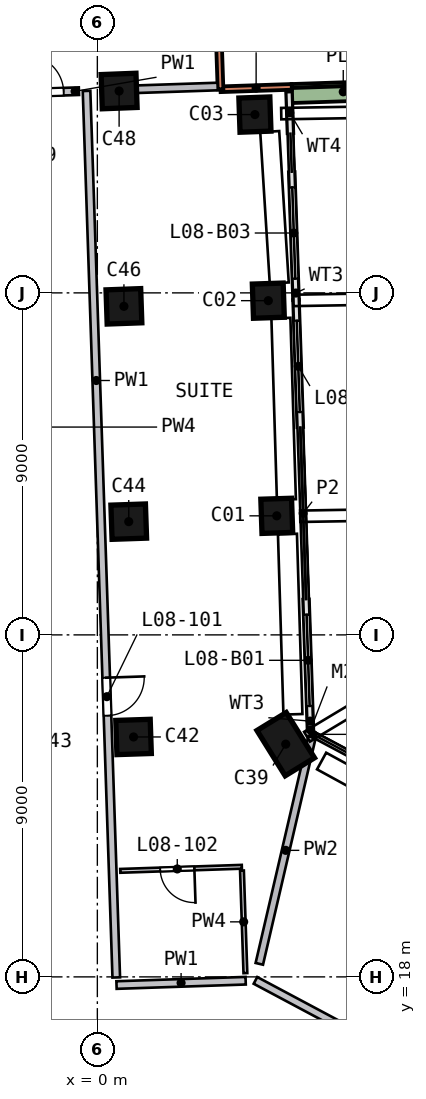
"""IFC4 building model, lengths in metres.
Left out: names, types, materials, properties, quantities, classifications, styles, units other than length and angle.
Written with IfcOpenShell. Run it as: python <this file> out.ifc"""

import sys

from ifc_helpers import new_model, si_unit, direction, frame, frame_2d, origin, origin_2d, place, context, subcontext, project, spatial, rectangle, extrude, element, fill, save


model = new_model("IFC4")
c1 = context("Model", 3, precision=1e-05, world=origin(), true_north=direction((0.0, 1.0)))
c2 = subcontext(c1, "Body", "Model", "MODEL_VIEW")
j1 = project(units=[si_unit("LENGTHUNIT", "METRE"), si_unit("PLANEANGLEUNIT", "RADIAN")], contexts=[c1])
p1 = place(None, origin())
s1 = spatial("IfcSite", under=j1, at=p1, CompositionType="ELEMENT")
p2 = place(p1, origin())
s2 = spatial("IfcBuilding", under=s1, at=p2, CompositionType="ELEMENT")
p3 = place(p2, frame((0.0, 0.0, 42.5)))
s3 = spatial("IfcBuildingStorey", under=s2, at=p3, CompositionType="ELEMENT", Elevation=42.5)
p4 = place(p3, frame((4.894, 30.12, 0.0), z_axis=(-0.142336215, 0.010453644, 0.989763165), x_axis=(-0.031226717, 0.999399073, -0.015046079)))
e1 = element("IfcColumn", 1, at=p4, inside=s3, PredefinedType="COLUMN", context=c2, shape_type="SweptSolid", body=[
    extrude(rectangle(XDim=0.9, YDim=0.8, at=origin_2d()), origin(), (0.0, 0.0, 1.0), 3.223),
])
p5 = place(p3, frame((4.703, 35.798, 0.0), z_axis=(-0.167945562, -0.002263417, 0.985793673), x_axis=(-0.033091095, 0.999446749, -0.003342827)))
e2 = element("IfcColumn", 2, at=p5, inside=s3, PredefinedType="COLUMN", context=c2, shape_type="SweptSolid", body=[
    extrude(rectangle(XDim=0.9, YDim=0.8, at=origin_2d()), origin(), (0.0, 0.0, 1.0), 3.236),
])
p6 = place(p3, frame((4.378, 40.711, 0.0), z_axis=(-0.189716676, -0.01540274, 0.981718054), x_axis=(-0.035211098, 0.999340492, 0.008874696)))
e3 = element("IfcColumn", 3, at=p6, inside=s3, PredefinedType="COLUMN", context=c2, shape_type="SweptSolid", body=[
    extrude(rectangle(XDim=0.9, YDim=0.8, at=origin_2d()), origin(), (0.0, 0.0, 1.0), 3.249),
])
p7 = place(p3, frame((5.095, 24.096, 0.0), z_axis=(-0.114771967, 0.023258425, 0.99311955), x_axis=(0.521259361, -0.849627286, 0.080138343)))
e4 = element("IfcColumn", 4, at=p7, inside=s3, PredefinedType="COLUMN", context=c2, shape_type="SweptSolid", body=[
    extrude(rectangle(XDim=1.4, YDim=0.9, at=origin_2d()), origin(), (0.0, 0.0, 1.0), 3.212),
])
p8 = place(p3, frame((1.093, 24.309, 0.0), z_axis=(-0.115627147, 0.004257147, 0.993283565), x_axis=(-0.032307268, 0.99944561, -0.008044414)))
e5 = element("IfcColumn", 5, at=p8, inside=s3, PredefinedType="COLUMN", context=c2, shape_type="SweptSolid", body=[
    extrude(rectangle(XDim=0.9, YDim=0.9, at=origin_2d()), origin(), (0.0, 0.0, 1.0), 3.211),
])
p9 = place(p3, frame((0.998, 29.99, 0.0), z_axis=(-0.141597105, -0.008030654, 0.989891796), x_axis=(-0.034042234, 0.999415148, 0.00323841)))
e6 = element("IfcColumn", 6, at=p9, inside=s3, PredefinedType="COLUMN", context=c2, shape_type="SweptSolid", body=[
    extrude(rectangle(XDim=0.9, YDim=0.9, at=origin_2d()), origin(), (0.0, 0.0, 1.0), 3.222),
])
p10 = place(p3, frame((0.903, 35.671, 0.0), z_axis=(-0.167251811, -0.020218081, 0.985706884), x_axis=(-0.036219852, 0.999240812, 0.014350002)))
e7 = element("IfcColumn", 7, at=p10, inside=s3, PredefinedType="COLUMN", context=c2, shape_type="SweptSolid", body=[
    extrude(rectangle(XDim=0.9, YDim=0.9, at=origin_2d()), origin(), (0.0, 0.0, 1.0), 3.236),
])
p11 = place(p3, frame((0.808, 41.352, 0.0), z_axis=(-0.192389787, -0.032202582, 0.980790071), x_axis=(-0.03862246, 0.998935505, 0.025222254)))
e8 = element("IfcColumn", 8, at=p11, inside=s3, PredefinedType="COLUMN", context=c2, shape_type="SweptSolid", body=[
    extrude(rectangle(XDim=0.9, YDim=0.9, at=origin_2d()), origin(), (0.0, 0.0, 1.0), 3.252),
])
p12 = place(p3, frame((5.115, 41.421, 0.0), z_axis=(0.0, 0.0, 1.0), x_axis=(-0.999439837, -0.033466585, 0.0)))
e9 = element("IfcWall", 9, at=p12, inside=s3, PredefinedType="SOLIDWALL", context=c2, shape_type="SweptSolid", body=[
    extrude(rectangle(XDim=1.875, YDim=0.15, at=frame_2d((0.938, 0.0))), origin(), (0.0, 0.0, 1.0), 3.19),
])
p13 = place(p3, frame((3.241, 41.358, 0.0), z_axis=(0.0, 0.0, 1.0), x_axis=(-0.033504523, 0.999438566, 0.0)))
e10 = element("IfcWall", 10, at=p13, inside=s3, PredefinedType="SOLIDWALL", context=c2, shape_type="SweptSolid", body=[
    extrude(rectangle(XDim=1.8, YDim=0.15, at=frame_2d((0.9, 0.0))), origin(), (0.0, 0.0, 1.0), 3.19),
])
p14 = place(p3, frame((5.606, 24.53, 0.0), z_axis=(0.0, 0.0, 1.0), x_axis=(-0.033443869, 0.999440597, 0.0)))
e11 = element("IfcWall", 11, at=p14, inside=s3, PredefinedType="SOLIDWALL", context=c2, shape_type="SweptSolid", body=[
    extrude(rectangle(XDim=3.402, YDim=0.15, at=frame_2d((1.701, 0.0))), origin(), (0.0, 0.0, 1.0), 2.425),
])
p15 = place(p14, frame((0.602, 0.0, 0.0)))
e12 = element("IfcOpeningElement", 12, at=p15, cuts=e11, PredefinedType="OPENING", context=c2, shape_type="SweptSolid", body=[
    extrude(rectangle(XDim=2.4, YDim=2.4, at=frame_2d((1.2, 1.2))), frame((0.0, 0.085, 0.0), z_axis=(0.0, -1.0, 0.0), x_axis=(1.0, 0.0, 0.0)), (0.0, 0.0, 1.0), 0.17),
])
p16 = place(p3, frame((5.34, 32.468, 0.0), z_axis=(0.0, 0.0, 1.0), x_axis=(-0.033453153, 0.999440287, 0.0)))
e13 = element("IfcWall", 13, at=p16, inside=s3, PredefinedType="SOLIDWALL", context=c2, shape_type="SweptSolid", body=[
    extrude(rectangle(XDim=3.35, YDim=0.15, at=frame_2d((1.675, 0.0))), origin(), (0.0, 0.0, 1.0), 2.425),
])
p17 = place(p16, frame((0.4, 0.0, 0.0)))
e14 = element("IfcOpeningElement", 14, at=p17, cuts=e13, PredefinedType="OPENING", context=c2, shape_type="SweptSolid", body=[
    extrude(rectangle(XDim=2.4, YDim=2.4, at=frame_2d((1.2, 1.2))), frame((0.0, 0.085, 0.0), z_axis=(0.0, -1.0, 0.0), x_axis=(1.0, 0.0, 0.0)), (0.0, 0.0, 1.0), 0.17),
])
p18 = place(p3, frame((5.228, 35.815, 0.0), z_axis=(0.0, 0.0, 1.0), x_axis=(-0.033486551, 0.999439168, 0.0)))
e15 = element("IfcWall", 15, at=p18, inside=s3, PredefinedType="SOLIDWALL", context=c2, shape_type="SweptSolid", body=[
    extrude(rectangle(XDim=3.361, YDim=0.15, at=frame_2d((1.681, 0.0))), origin(), (0.0, 0.0, 1.0), 2.425),
])
p19 = place(p18, frame((0.561, 0.0, 0.0)))
e16 = element("IfcOpeningElement", 16, at=p19, cuts=e15, PredefinedType="OPENING", context=c2, shape_type="SweptSolid", body=[
    extrude(rectangle(XDim=2.4, YDim=2.4, at=frame_2d((1.2, 1.2))), frame((0.0, 0.085, 0.0), z_axis=(0.0, -1.0, 0.0), x_axis=(1.0, 0.0, 0.0)), (0.0, 0.0, 1.0), 0.17),
])
p20 = place(p3, frame((5.081, 40.205, 0.0), z_axis=(0.0, 0.0, 1.0), x_axis=(-0.033558064, 0.99943677, 0.0)))
e17 = element("IfcWall", 17, at=p20, inside=s3, PredefinedType="SOLIDWALL", context=c2, shape_type="SweptSolid", body=[
    extrude(rectangle(XDim=1.069, YDim=0.15, at=frame_2d((0.535, 0.0))), origin(), (0.0, 0.0, 1.0), 2.425),
])
p21 = place(p3, frame((7.819, 41.336, 0.0), z_axis=(0.0, 0.0, 1.0), x_axis=(-0.999439674, -0.033471459, 0.0)))
e18 = element("IfcWall", 18, at=p21, inside=s3, PredefinedType="SOLIDWALL", context=c2, shape_type="SweptSolid", body=[
    extrude(rectangle(XDim=2.699, YDim=0.5, at=frame_2d((1.349, 0.0))), origin(), (0.0, 0.0, 1.0), 0.7),
])
p22 = place(p3, frame((-2.285, 41.248, 0.0), z_axis=(0.0, 0.0, 1.0), x_axis=(0.999439934, 0.033463693, 0.0)))
e19 = element("IfcWall", 19, at=p22, inside=s3, PredefinedType="SOLIDWALL", context=c2, shape_type="SweptSolid", body=[
    extrude(rectangle(XDim=1.802, YDim=0.2, at=frame_2d((0.901, 0.0))), origin(), (0.0, 0.0, 1.0), 3.19),
])
p23 = place(p22, frame((0.4, 0.0, 0.0)))
e20 = element("IfcOpeningElement", 20, at=p23, cuts=e19, PredefinedType="OPENING", context=c2, shape_type="SweptSolid", body=[
    extrude(rectangle(XDim=1.0, YDim=2.1, at=frame_2d((0.5, 1.05))), frame((0.0, 0.11, 0.0), z_axis=(0.0, -1.0, 0.0), x_axis=(1.0, 0.0, 0.0)), (0.0, 0.0, 1.0), 0.22),
])
p24 = place(p3, frame((-0.284, 41.315, 0.0), z_axis=(0.0, 0.0, 1.0), x_axis=(0.033510193, -0.999438376, 0.0)))
e21 = element("IfcWall", 21, at=p24, inside=s3, PredefinedType="SOLIDWALL", context=c2, shape_type="SweptSolid", body=[
    extrude(rectangle(XDim=23.343, YDim=0.2, at=frame_2d((11.671, 0.0))), origin(), (0.0, 0.0, 1.0), 3.19),
])
p25 = place(p24, frame((15.45, 0.0, 0.0)))
e22 = element("IfcOpeningElement", 22, at=p25, cuts=e21, PredefinedType="OPENING", context=c2, shape_type="SweptSolid", body=[
    extrude(rectangle(XDim=1.0, YDim=2.1, at=frame_2d((0.5, 1.05))), frame((0.0, 0.11, 0.0), z_axis=(0.0, -1.0, 0.0), x_axis=(1.0, 0.0, 0.0)), (0.0, 0.0, 1.0), 0.22),
])
p26 = place(p3, frame((3.903, 17.899, 0.0), z_axis=(0.0, 0.0, 1.0), x_axis=(-0.999437631, -0.033532393, 0.0)))
e23 = element("IfcWall", 23, at=p26, inside=s3, PredefinedType="SOLIDWALL", context=c2, shape_type="SweptSolid", body=[
    extrude(rectangle(XDim=3.4, YDim=0.2, at=frame_2d((1.7, 0.0))), origin(), (0.0, 0.0, 1.0), 3.19),
])
p27 = place(p3, frame((12.557, 13.428, 0.0), z_axis=(0.0, 0.0, 1.0), x_axis=(-0.882292568, 0.470701417, 0.0)))
e24 = element("IfcWall", 24, at=p27, inside=s3, PredefinedType="SOLIDWALL", context=c2, shape_type="SweptSolid", body=[
    extrude(rectangle(XDim=9.516, YDim=0.2, at=frame_2d((4.758, 0.0))), origin(), (0.0, 0.0, 1.0), 3.19),
])
p28 = place(p3, frame((0.163, 41.33, 0.0), z_axis=(0.0, 0.0, 1.0), x_axis=(0.999436852, 0.033555599, 0.0)))
e25 = element("IfcWall", 25, at=p28, inside=s3, PredefinedType="SOLIDWALL", context=c2, shape_type="SweptSolid", body=[
    extrude(rectangle(XDim=3.005, YDim=0.2, at=frame_2d((1.502, 0.0))), origin(), (0.0, 0.0, 1.0), 3.19),
])
p29 = place(p3, frame((5.65, 24.316, 0.0), z_axis=(0.0, 0.0, 1.0), x_axis=(-0.226304429, -0.974056623, 0.0)))
e26 = element("IfcWall", 26, at=p29, inside=s3, PredefinedType="SOLIDWALL", context=c2, shape_type="SweptSolid", body=[
    extrude(rectangle(XDim=6.132, YDim=0.2, at=frame_2d((3.066, 0.0))), origin(), (0.0, 0.0, 1.0), 3.19),
])
p30 = place(p3, frame((3.802, 20.897, 0.0), z_axis=(0.0, 0.0, 1.0), x_axis=(-0.999438964, -0.033492649, 0.0)))
e27 = element("IfcWall", 27, at=p30, inside=s3, PredefinedType="PARTITIONING", context=c2, shape_type="SweptSolid", body=[
    extrude(rectangle(XDim=3.2, YDim=0.1, at=frame_2d((1.6, 0.0))), origin(), (0.0, 0.0, 1.0), 3.19),
])
p31 = place(p30, frame((1.25, 0.0, 0.0)))
e28 = element("IfcOpeningElement", 28, at=p31, cuts=e27, PredefinedType="OPENING", context=c2, shape_type="SweptSolid", body=[
    extrude(rectangle(XDim=0.9, YDim=2.1, at=frame_2d((0.45, 1.05))), frame((0.0, 0.06, 0.0), z_axis=(0.0, -1.0, 0.0), x_axis=(1.0, 0.0, 0.0)), (0.0, 0.0, 1.0), 0.12),
])
p32 = place(p3, frame((3.805, 20.798, 0.0), z_axis=(0.0, 0.0, 1.0), x_axis=(0.033456335, -0.99944018, 0.0)))
e29 = element("IfcWall", 29, at=p32, inside=s3, PredefinedType="PARTITIONING", context=c2, shape_type="SweptSolid", body=[
    extrude(rectangle(XDim=2.7, YDim=0.1, at=frame_2d((1.35, 0.0))), origin(), (0.0, 0.0, 1.0), 3.19),
])
p33 = place(p15, origin())
e30 = element("IfcDoor", 30, at=p33, inside=s3, OperationType="SLIDING_TO_LEFT", PredefinedType="DOOR", context=c2, shape_type="SweptSolid", body=[
    extrude(rectangle(XDim=2.4, YDim=2.4, at=frame_2d((1.2, 1.2))), frame((0.0, 0.025, 0.0), z_axis=(0.0, -1.0, 0.0), x_axis=(1.0, 0.0, 0.0)), (0.0, 0.0, 1.0), 0.05),
])
fill(e12, e30)
p34 = place(p17, origin())
e31 = element("IfcDoor", 31, at=p34, inside=s3, OperationType="SLIDING_TO_RIGHT", PredefinedType="DOOR", context=c2, shape_type="SweptSolid", body=[
    extrude(rectangle(XDim=2.4, YDim=2.4, at=frame_2d((1.2, 1.2))), frame((0.0, 0.025, 0.0), z_axis=(0.0, -1.0, 0.0), x_axis=(1.0, 0.0, 0.0)), (0.0, 0.0, 1.0), 0.05),
])
fill(e14, e31)
p35 = place(p19, origin())
e32 = element("IfcDoor", 32, at=p35, inside=s3, OperationType="SLIDING_TO_LEFT", PredefinedType="DOOR", context=c2, shape_type="SweptSolid", body=[
    extrude(rectangle(XDim=2.4, YDim=2.4, at=frame_2d((1.2, 1.2))), frame((0.0, 0.025, 0.0), z_axis=(0.0, -1.0, 0.0), x_axis=(1.0, 0.0, 0.0)), (0.0, 0.0, 1.0), 0.05),
])
fill(e16, e32)
p36 = place(p25, origin())
e33 = element("IfcDoor", 33, at=p36, inside=s3, OperationType="SINGLE_SWING_LEFT", PredefinedType="DOOR", context=c2, shape_type="SweptSolid", body=[
    extrude(rectangle(XDim=1.0, YDim=2.1, at=frame_2d((0.5, 1.05))), frame((0.0, 0.025, 0.0), z_axis=(0.0, -1.0, 0.0), x_axis=(1.0, 0.0, 0.0)), (0.0, 0.0, 1.0), 0.05),
])
fill(e22, e33)
p37 = place(p31, origin())
e34 = element("IfcDoor", 34, at=p37, inside=s3, OperationType="SINGLE_SWING_LEFT", PredefinedType="DOOR", context=c2, shape_type="SweptSolid", body=[
    extrude(rectangle(XDim=0.9, YDim=2.1, at=frame_2d((0.45, 1.05))), frame((0.0, 0.025, 0.0), z_axis=(0.0, -1.0, 0.0), x_axis=(1.0, 0.0, 0.0)), (0.0, 0.0, 1.0), 0.05),
])
fill(e28, e34)
p38 = place(p23, origin())
e35 = element("IfcDoor", 35, at=p38, inside=s3, OperationType="SINGLE_SWING_LEFT", PredefinedType="DOOR", context=c2, shape_type="SweptSolid", body=[
    extrude(rectangle(XDim=1.0, YDim=2.1, at=frame_2d((0.5, 1.05))), frame((0.0, 0.025, 0.0), z_axis=(0.0, -1.0, 0.0), x_axis=(1.0, 0.0, 0.0)), (0.0, 0.0, 1.0), 0.05),
])
fill(e20, e35)
save(model, sys.argv[1])
